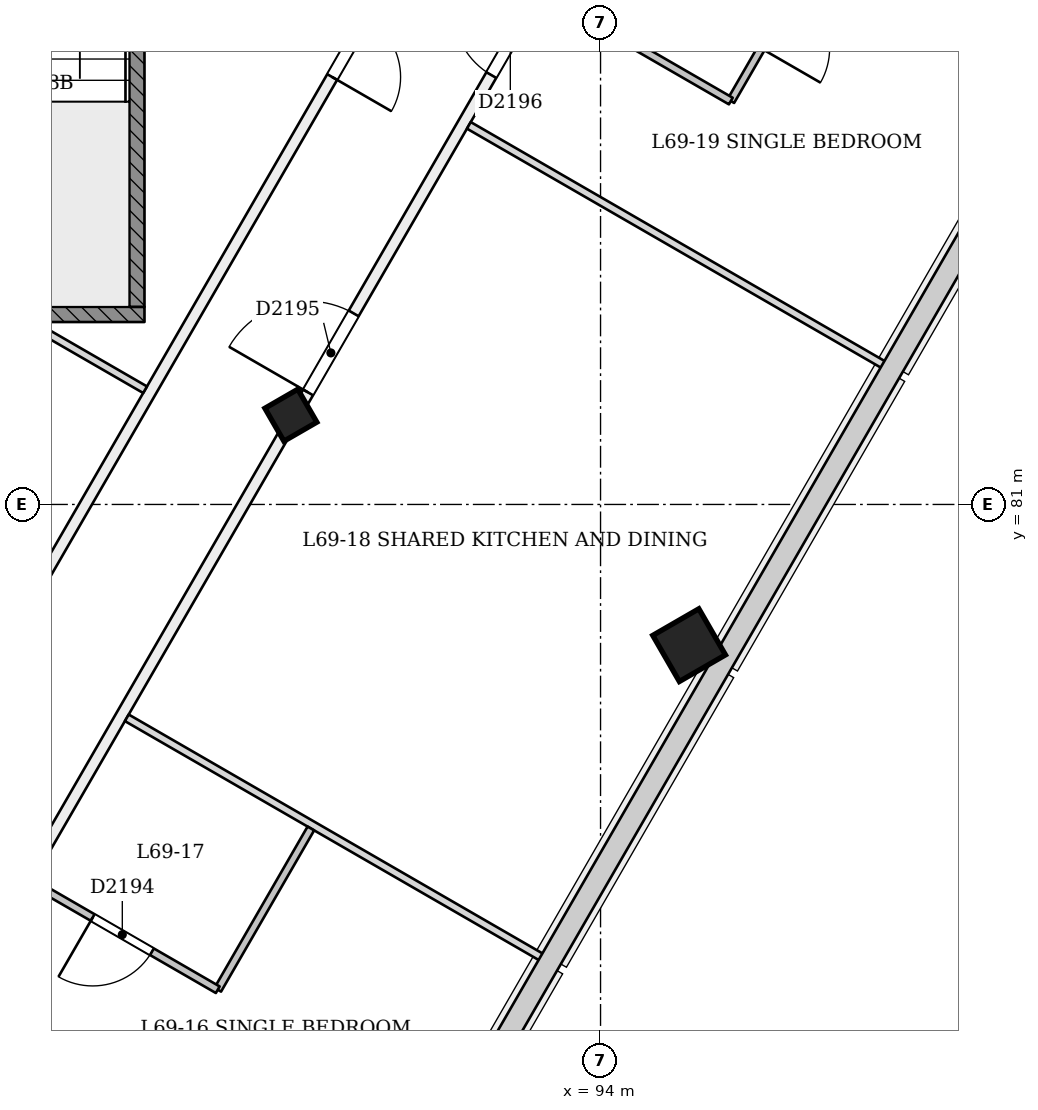
"""IFC4 building model, lengths in metres.
Left out: names, types, materials, properties, quantities, classifications, styles, units other than length and angle.
Written with IfcOpenShell. Run it as: python <this file> out.ifc"""

import sys

from ifc_helpers import new_model, si_unit, direction, frame, frame_2d, origin, origin_2d, place, context, subcontext, project, spatial, rectangle, extrude, element, fill, save


model = new_model("IFC4")
c1 = context("Model", 3, precision=1e-05, world=origin(), true_north=direction((0.0, 1.0)))
c2 = subcontext(c1, "Body", "Model", "MODEL_VIEW")
j1 = project(units=[si_unit("LENGTHUNIT", "METRE"), si_unit("PLANEANGLEUNIT", "RADIAN")], contexts=[c1])
p1 = place(None, origin())
s1 = spatial("IfcSite", under=j1, at=p1, CompositionType="ELEMENT")
p2 = place(p1, origin())
s2 = spatial("IfcBuilding", under=s1, at=p2, CompositionType="ELEMENT")
p3 = place(p2, frame((0.0, 0.0, 268.0)))
s3 = spatial("IfcBuildingStorey", under=s2, at=p3, CompositionType="ELEMENT", Elevation=268.0)
p4 = place(p3, frame((89.953, 82.127, -0.015), z_axis=(-0.022221406801, 0.038413224561, 0.999014831351), x_axis=(-0.499512925744, -0.866022227907, 0.022188685988)))
e1 = element("IfcColumn", 1, at=p4, inside=s3, PredefinedType="COLUMN", context=c2, shape_type="SweptSolid", body=[
    extrude(rectangle(XDim=0.5, YDim=0.5, at=origin_2d()), origin(), (0.0, 0.0, 1.0), 3.604),
])
p5 = place(p3, frame((95.192, 79.102, -0.021), z_axis=(-0.02215369191, 0.038413282303, 0.999016333038), x_axis=(-0.500657381292, -0.865361542271, 0.022171777484)))
e2 = element("IfcColumn", 2, at=p5, inside=s3, PredefinedType="COLUMN", context=c2, shape_type="SweptSolid", body=[
    extrude(rectangle(XDim=0.7, YDim=0.7, at=origin_2d()), origin(), (0.0, 0.0, 1.0), 3.604),
])
p6 = place(p3, frame((92.765, 90.6, 0.0), z_axis=(0.0, 0.0, 1.0), x_axis=(-0.499990489834, -0.866030894411, 0.0)))
e3 = element("IfcWall", 3, at=p6, inside=s3, PredefinedType="PARTITIONING", context=c2, shape_type="SweptSolid", body=[
    extrude(rectangle(XDim=15.401, YDim=0.15, at=frame_2d((7.701, 0.0))), origin(), (0.0, 0.0, 1.0), 3.2),
])
p7 = place(p6, frame((3.692, 0.0, 0.0)))
e4 = element("IfcOpeningElement", 4, at=p7, cuts=e3, PredefinedType="OPENING", context=c2, shape_type="SweptSolid", body=[
    extrude(rectangle(XDim=0.9, YDim=2.1, at=frame_2d((0.45, 1.05))), frame((0.0, 0.085, 0.0), z_axis=(0.0, -1.0, 0.0), x_axis=(1.0, 0.0, 0.0)), (0.0, 0.0, 1.0), 0.171),
])
p8 = place(p3, frame((85.065, 73.662, 0.0), z_axis=(0.0, 0.0, 1.0), x_axis=(0.500001595071, 0.866024482868, 0.0)))
e5 = element("IfcWall", 5, at=p8, inside=s3, PredefinedType="PARTITIONING", context=c2, shape_type="SweptSolid", body=[
    extrude(rectangle(XDim=19.558, YDim=0.15, at=frame_2d((9.779, 0.0))), origin(), (0.0, 0.0, 1.0), 2.8),
])
p9 = place(p8, frame((1.496, 0.0, 0.0)))
e6 = element("IfcOpeningElement", 6, at=p9, cuts=e5, PredefinedType="OPENING", context=c2, shape_type="SweptSolid", body=[
    extrude(rectangle(XDim=1.0, YDim=2.1, at=frame_2d((0.5, 1.05))), frame((0.0, 0.085, 0.0), z_axis=(0.0, -1.0, 0.0), x_axis=(1.0, 0.0, 0.0)), (0.0, 0.0, 1.0), 0.171),
])
p10 = place(p8, frame((10.175, 0.0, 0.0)))
e7 = element("IfcOpeningElement", 7, at=p10, cuts=e5, PredefinedType="OPENING", context=c2, shape_type="SweptSolid", body=[
    extrude(rectangle(XDim=1.2, YDim=2.1, at=frame_2d((0.6, 1.05))), frame((0.0, 0.085, 0.0), z_axis=(0.0, -1.0, 0.0), x_axis=(1.0, 0.0, 0.0)), (0.0, 0.0, 1.0), 0.171),
])
p11 = place(p8, frame((14.996, 0.0, 0.0)))
e8 = element("IfcOpeningElement", 8, at=p11, cuts=e5, PredefinedType="OPENING", context=c2, shape_type="SweptSolid", body=[
    extrude(rectangle(XDim=1.0, YDim=2.1, at=frame_2d((0.5, 1.05))), frame((0.0, 0.085, 0.0), z_axis=(0.0, -1.0, 0.0), x_axis=(1.0, 0.0, 0.0)), (0.0, 0.0, 1.0), 0.171),
])
p12 = place(p3, frame((86.465, 83.4, 0.0), z_axis=(0.0, 0.0, 1.0), x_axis=(0.866066891438, -0.49992813439, 0.0)))
e9 = element("IfcWall", 9, at=p12, inside=s3, PredefinedType="PARTITIONING", context=c2, shape_type="SweptSolid", body=[
    extrude(rectangle(XDim=1.781, YDim=0.1, at=frame_2d((0.891, 0.0))), origin(), (0.0, 0.0, 1.0), 3.2),
])
p13 = place(p3, frame((90.995, 71.134, 0.0), z_axis=(0.0, 0.0, 1.0), x_axis=(-0.866015887322, 0.500016482634, 0.0)))
e10 = element("IfcWall", 10, at=p13, inside=s3, PredefinedType="PARTITIONING", context=c2, shape_type="SweptSolid", body=[
    extrude(rectangle(XDim=6.325, YDim=0.1, at=frame_2d((3.163, 0.0))), origin(), (0.0, 0.0, 1.0), 2.7),
])
p14 = place(p3, frame((90.189, 76.737, 0.0), z_axis=(0.0, 0.0, 1.0), x_axis=(-0.500018594424, -0.866014668023, 0.0)))
e11 = element("IfcWall", 11, at=p14, inside=s3, PredefinedType="PARTITIONING", context=c2, shape_type="SweptSolid", body=[
    extrude(rectangle(XDim=2.45, YDim=0.1, at=frame_2d((1.225, 0.0))), origin(), (0.0, 0.0, 1.0), 3.2),
])
p15 = place(p3, frame((88.964, 74.615, 0.0), z_axis=(0.0, 0.0, 1.0), x_axis=(-0.865989837833, 0.500061596976, 0.0)))
e12 = element("IfcWall", 12, at=p15, inside=s3, PredefinedType="PARTITIONING", context=c2, shape_type="SweptSolid", body=[
    extrude(rectangle(XDim=2.825, YDim=0.1, at=frame_2d((1.413, 0.0))), origin(), (0.0, 0.0, 1.0), 3.2),
])
p16 = place(p15, frame((1.0, 0.0, 0.0)))
e13 = element("IfcOpeningElement", 13, at=p16, cuts=e12, PredefinedType="OPENING", context=c2, shape_type="SweptSolid", body=[
    extrude(rectangle(XDim=0.9, YDim=2.1, at=frame_2d((0.45, 1.05))), frame((0.0, 0.061, 0.0), z_axis=(0.0, -1.0, 0.0), x_axis=(1.0, 0.0, 0.0)), (0.0, 0.0, 1.0), 0.121),
])
p17 = place(p3, frame((93.262, 75.021, 0.0), z_axis=(0.0, 0.0, 1.0), x_axis=(-0.866015781869, 0.500016665277, 0.0)))
e14 = element("IfcWall", 14, at=p17, inside=s3, PredefinedType="PARTITIONING", context=c2, shape_type="SweptSolid", body=[
    extrude(rectangle(XDim=6.345, YDim=0.1, at=frame_2d((3.172, 0.0))), origin(), (0.0, 0.0, 1.0), 2.7),
])
p18 = place(p3, frame((97.762, 82.815, 0.0), z_axis=(0.0, 0.0, 1.0), x_axis=(-0.866025401434, 0.500000004071, 0.0)))
e15 = element("IfcWall", 15, at=p18, inside=s3, PredefinedType="PARTITIONING", context=c2, shape_type="SweptSolid", body=[
    extrude(rectangle(XDim=6.345, YDim=0.1, at=frame_2d((3.173, 0.0))), origin(), (0.0, 0.0, 1.0), 2.7),
])
p19 = place(p3, frame((98.135, 90.5, 0.0), z_axis=(0.0, 0.0, 1.0), x_axis=(-0.50000034515, -0.866025204512, 0.0)))
e16 = element("IfcWall", 16, at=p19, inside=s3, PredefinedType="PARTITIONING", context=c2, shape_type="SweptSolid", body=[
    extrude(rectangle(XDim=4.842, YDim=0.1, at=frame_2d((2.421, 0.0))), origin(), (0.0, 0.0, 1.0), 2.8),
])
p20 = place(p19, frame((3.142, 0.0, 0.0)))
e17 = element("IfcOpeningElement", 17, at=p20, cuts=e16, PredefinedType="OPENING", context=c2, shape_type="SweptSolid", body=[
    extrude(rectangle(XDim=0.9, YDim=2.1, at=frame_2d((0.45, 1.05))), frame((0.0, 0.061, 0.0), z_axis=(0.0, -1.0, 0.0), x_axis=(1.0, 0.0, 0.0)), (0.0, 0.0, 1.0), 0.121),
])
p21 = place(p19, frame((1.01, 0.0, 0.0)))
e18 = element("IfcOpeningElement", 18, at=p21, cuts=e16, PredefinedType="OPENING", context=c2, shape_type="SweptSolid", body=[
    extrude(rectangle(XDim=0.9, YDim=2.1, at=frame_2d((0.45, 1.05))), frame((0.0, 0.061, 0.0), z_axis=(0.0, -1.0, 0.0), x_axis=(1.0, 0.0, 0.0)), (0.0, 0.0, 1.0), 0.121),
])
p22 = place(p3, frame((95.714, 86.307, 0.0), z_axis=(0.0, 0.0, 1.0), x_axis=(-0.865989837833, 0.500061596976, 0.0)))
e19 = element("IfcWall", 19, at=p22, inside=s3, PredefinedType="PARTITIONING", context=c2, shape_type="SweptSolid", body=[
    extrude(rectangle(XDim=2.825, YDim=0.1, at=frame_2d((1.413, 0.0))), origin(), (0.0, 0.0, 1.0), 3.2),
])
p23 = place(p3, frame((99.995, 86.722, 0.0), z_axis=(0.0, 0.0, 1.0), x_axis=(-0.866013532718, 0.500020560727, 0.0)))
e20 = element("IfcWall", 20, at=p23, inside=s3, PredefinedType="PARTITIONING", context=c2, shape_type="SweptSolid", body=[
    extrude(rectangle(XDim=3.45, YDim=0.15, at=frame_2d((1.725, 0.0))), origin(), (0.0, 0.0, 1.0), 2.7),
])
p24 = place(p3, frame((82.0, 83.5, 0.0), z_axis=(0.0, 0.0, 1.0), x_axis=(1.0, 0.0, 0.0)))
e21 = element("IfcWall", 21, at=p24, inside=s3, PredefinedType="SOLIDWALL", context=c2, shape_type="SweptSolid", body=[
    extrude(rectangle(XDim=6.0, YDim=0.2, at=frame_2d((3.0, 0.0))), origin(), (0.0, 0.0, 1.0), 3.2),
])
p25 = place(p3, frame((87.9, 83.6, 0.0), z_axis=(0.0, 0.0, 1.0), x_axis=(0.0, 1.0, 0.0)))
e22 = element("IfcWall", 22, at=p25, inside=s3, PredefinedType="SOLIDWALL", context=c2, shape_type="SweptSolid", body=[
    extrude(rectangle(XDim=6.8, YDim=0.2, at=frame_2d((3.4, 0.0))), origin(), (0.0, 0.0, 1.0), 3.2),
])
p26 = place(p7, origin())
e23 = element("IfcDoor", 23, at=p26, inside=s3, OperationType="SINGLE_SWING_RIGHT", PredefinedType="NOTDEFINED", context=c2, shape_type="SweptSolid", body=[
    extrude(rectangle(XDim=0.9, YDim=2.1, at=frame_2d((0.45, 1.05))), frame((0.0, 0.025, 0.0), z_axis=(0.0, -1.0, 0.0), x_axis=(1.0, 0.0, 0.0)), (0.0, 0.0, 1.0), 0.05),
])
fill(e4, e23)
p27 = place(p16, origin())
e24 = element("IfcDoor", 24, at=p27, inside=s3, OperationType="SINGLE_SWING_RIGHT", PredefinedType="NOTDEFINED", context=c2, shape_type="SweptSolid", body=[
    extrude(rectangle(XDim=0.9, YDim=2.1, at=frame_2d((0.45, 1.05))), frame((0.0, 0.025, 0.0), z_axis=(0.0, -1.0, 0.0), x_axis=(1.0, 0.0, 0.0)), (0.0, 0.0, 1.0), 0.05),
])
fill(e13, e24)
p28 = place(p10, origin())
e25 = element("IfcDoor", 25, at=p28, inside=s3, OperationType="SINGLE_SWING_LEFT", PredefinedType="NOTDEFINED", context=c2, shape_type="SweptSolid", body=[
    extrude(rectangle(XDim=1.2, YDim=2.1, at=frame_2d((0.6, 1.05))), frame((0.0, 0.025, 0.0), z_axis=(0.0, -1.0, 0.0), x_axis=(1.0, 0.0, 0.0)), (0.0, 0.0, 1.0), 0.05),
])
fill(e7, e25)
p29 = place(p11, origin())
e26 = element("IfcDoor", 26, at=p29, inside=s3, OperationType="SINGLE_SWING_RIGHT", PredefinedType="NOTDEFINED", context=c2, shape_type="SweptSolid", body=[
    extrude(rectangle(XDim=1.0, YDim=2.1, at=frame_2d((0.5, 1.05))), frame((0.0, 0.025, 0.0), z_axis=(0.0, -1.0, 0.0), x_axis=(1.0, 0.0, 0.0)), (0.0, 0.0, 1.0), 0.05),
])
fill(e8, e26)
save(model, sys.argv[1])
